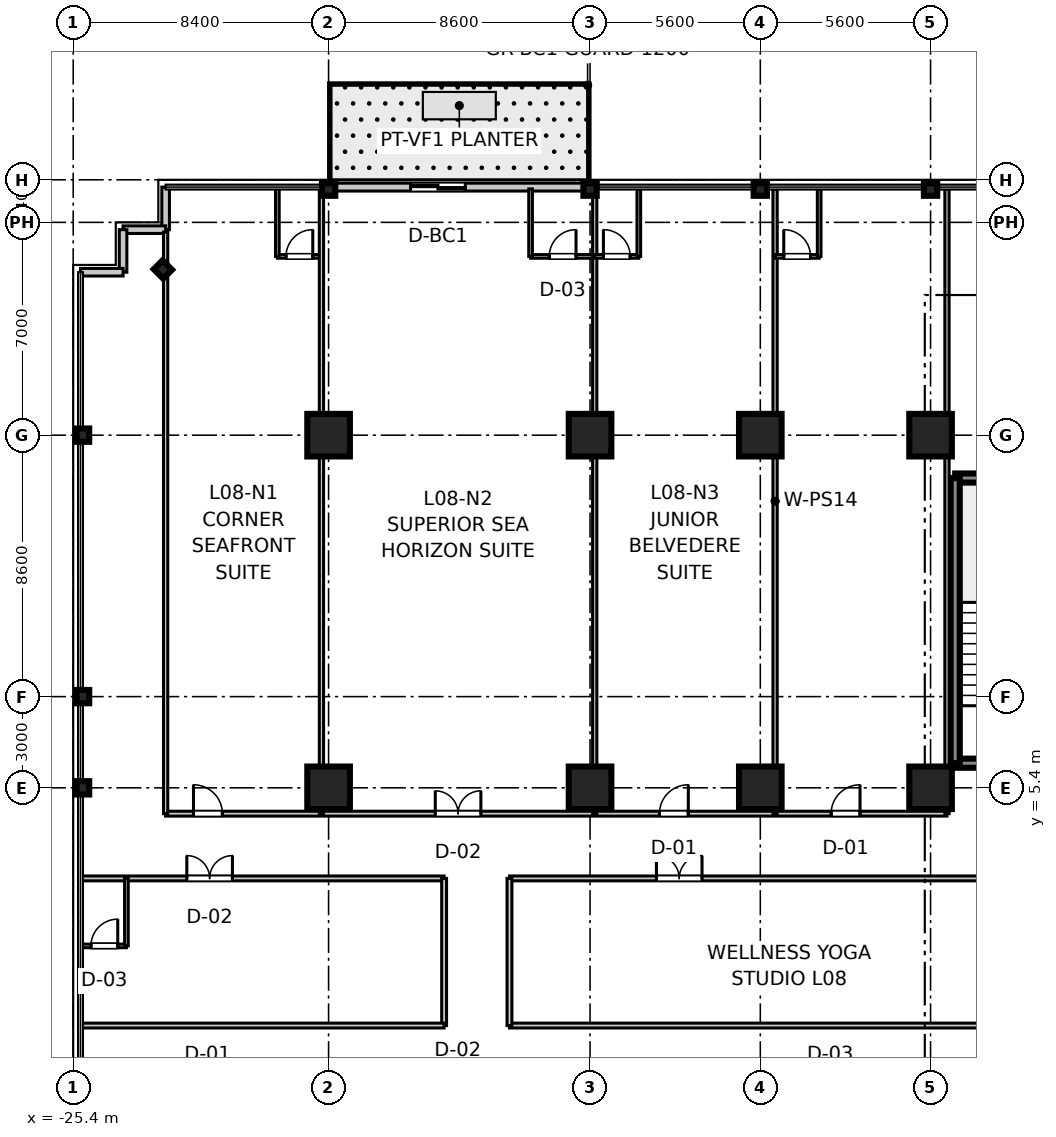
"""IFC4 building model, lengths in metres.
Left out: names, types, materials, properties, quantities, classifications, styles, units other than length and angle.
Written with IfcOpenShell. Run it as: python <this file> out.ifc"""

import sys

from ifc_helpers import new_model, si_unit, direction, frame, frame_2d, origin, origin_2d, place, context, subcontext, project, spatial, rectangle, i_section, extrude, source, transform, mapped, element, fill, save


model = new_model("IFC4")
c1 = context("Model", 3, precision=1e-05, world=origin(), true_north=direction((0.0, 1.0)))
c2 = subcontext(c1, "Body", "Model", "MODEL_VIEW")
j1 = project(units=[si_unit("LENGTHUNIT", "METRE"), si_unit("PLANEANGLEUNIT", "RADIAN")], contexts=[c1])
p1 = place(None, origin())
s1 = spatial("IfcSite", under=j1, at=p1, CompositionType="ELEMENT")
p2 = place(p1, origin())
s2 = spatial("IfcBuilding", under=s1, at=p2, CompositionType="ELEMENT")
p3 = place(p2, frame((0.0, 0.0, 39.7)))
s3 = spatial("IfcBuildingStorey", under=s2, at=p3, CompositionType="ELEMENT", Elevation=39.7)
m1 = source(origin(), c2, "Body", "SweptSolid", [
    extrude(rectangle(XDim=1.4, YDim=1.4, at=origin_2d()), origin(), (0.0, 0.0, 1.0), 3.605),
])
for number, where, z_axis, x_axis in (
    (1, (-17.0, 5.4, 0.0), (0.0, 0.0, 1.0), (1.0, 0.0, 0.0)),
    (2, (-17.0, 17.0, 0.0), (0.0, 0.0, 1.0), (1.0, 0.0, 0.0)),
    (3, (-8.4, 5.4, 0.0), (0.0, 0.0, 1.0), (1.0, 0.0, 0.0)),
    (4, (-8.4, 17.0, 0.0), (0.0, 0.0, 1.0), (1.0, 0.0, 0.0)),
    (5, (-2.8, 5.4, 0.0), (0.0, 0.0, 1.0), (1.0, 0.0, 0.0)),
    (6, (-2.8, 17.0, 0.0), (0.0, 0.0, 1.0), (1.0, 0.0, 0.0)),
    (7, (2.8, 5.4, 0.0), (0.0, 0.0, 1.0), (1.0, 0.0, 0.0)),
    (8, (2.8, 17.0, 0.0), (0.0, 0.0, 1.0), (1.0, 0.0, 0.0)),
):
    element("IfcColumn", number, at=place(p3, frame(where, z_axis=z_axis, x_axis=x_axis)), inside=s3, PredefinedType="COLUMN", context=c2, shape_type="MappedRepresentation", body=[
        mapped(m1, transform((0.0, 0.0, 0.0), scale=1.0)),
    ])
m2 = source(origin(), c2, "Body", "SweptSolid", [
    extrude(i_section(OverallWidth=0.412, OverallDepth=0.438, WebThickness=0.023, FlangeThickness=0.036, at=origin_2d()), origin(), (0.0, 0.0, 1.0), 3.605),
])
for number, where, z_axis, x_axis in (
    (9, (-25.08, 5.4, 0.0), (0.0, 0.0, 1.0), (1.0, 0.0, 0.0)),
    (10, (-25.08, 8.4, 0.0), (0.0, 0.0, 1.0), (1.0, 0.0, 0.0)),
    (11, (-25.08, 17.0, 0.0), (0.0, 0.0, 1.0), (1.0, 0.0, 0.0)),
    (12, (-17.0, 25.08, 0.0), (0.0, 0.0, 1.0), (0.0, 1.0, 0.0)),
    (13, (-8.4, 25.08, 0.0), (0.0, 0.0, 1.0), (0.0, 1.0, 0.0)),
    (14, (-2.8, 25.08, 0.0), (0.0, 0.0, 1.0), (0.0, 1.0, 0.0)),
    (15, (2.8, 25.08, 0.0), (0.0, 0.0, 1.0), (0.0, 1.0, 0.0)),
    (16, (-22.45, 22.45, 0.0), (0.0, 0.0, 1.0), (0.707, 0.707, 0.0)),
):
    element("IfcColumn", number, at=place(p3, frame(where, z_axis=z_axis, x_axis=x_axis)), inside=s3, PredefinedType="COLUMN", context=c2, shape_type="MappedRepresentation", body=[
        mapped(m2, transform((0.0, 0.0, 0.0), scale=1.0)),
    ])
m3 = source(origin(), c2, "Body", "SweptSolid", [
    extrude(rectangle(XDim=3.98, YDim=0.3, at=frame_2d((1.99, 0.0))), origin(), (0.0, 0.0, 1.0), 3.37),
])
for number, where, z_axis, x_axis in (
    (17, (3.61, 6.21, 0.0), (0.0, 0.0, 1.0), (1.0, 0.0, 0.0)),
    (18, (3.61, 15.59, 0.0), (0.0, 0.0, 1.0), (1.0, 0.0, 0.0)),
):
    element("IfcWall", number, at=place(p3, frame(where, z_axis=z_axis, x_axis=x_axis)), inside=s3, PredefinedType="SHEAR", context=c2, shape_type="MappedRepresentation", body=[
        mapped(m3, transform((0.0, 0.0, 0.0), scale=1.0)),
    ])
m4 = source(origin(), c2, "Body", "SweptSolid", [
    extrude(rectangle(XDim=9.38, YDim=0.3, at=frame_2d((4.69, 0.0))), origin(), (0.0, 0.0, 1.0), 3.37),
])
p4 = place(p3, frame((3.61, 6.21, 0.0), z_axis=(0.0, 0.0, 1.0), x_axis=(0.0, 1.0, 0.0)))
e19 = element("IfcWall", 19, at=p4, inside=s3, PredefinedType="SHEAR", context=c2, shape_type="MappedRepresentation", body=[
    mapped(m4, transform((0.0, 0.0, 0.0), scale=1.0)),
])
m5 = source(origin(), c2, "Body", "SweptSolid", [
    extrude(rectangle(XDim=1.4, YDim=0.25, at=frame_2d((0.7, 0.0))), origin(), (0.0, 0.0, 1.0), 3.37),
])
for number, where, z_axis, x_axis in (
    (20, (-22.36, 23.76, 0.0), (0.0, 0.0, 1.0), (0.0, 1.0, 0.0)),
    (21, (-23.76, 23.76, 0.0), (0.0, 0.0, 1.0), (1.0, 0.0, 0.0)),
    (22, (-23.76, 22.36, 0.0), (0.0, 0.0, 1.0), (0.0, 1.0, 0.0)),
    (23, (-25.16, 22.36, 0.0), (0.0, 0.0, 1.0), (1.0, 0.0, 0.0)),
):
    element("IfcWall", number, at=place(p3, frame(where, z_axis=z_axis, x_axis=x_axis)), inside=s3, PredefinedType="STANDARD", context=c2, shape_type="MappedRepresentation", body=[
        mapped(m5, transform((0.0, 0.0, 0.0), scale=1.0)),
    ])
m6 = source(origin(), c2, "Body", "SweptSolid", [
    extrude(rectangle(XDim=8.6, YDim=0.26, at=frame_2d((4.3, 0.0))), origin(), (0.0, 0.0, 1.0), 2.85),
])
p5 = place(p3, frame((-17.0, 25.16, 0.0), z_axis=(0.0, 0.0, 1.0), x_axis=(1.0, 0.0, 0.0)))
e24 = element("IfcWall", 24, at=p5, inside=s3, PredefinedType="STANDARD", context=c2, shape_type="MappedRepresentation", body=[
    mapped(m6, transform((0.0, 0.0, 0.0), scale=1.0)),
])
p6 = place(p5, frame((2.697, 0.0, 0.0)))
e25 = element("IfcOpeningElement", 25, at=p6, cuts=e24, PredefinedType="OPENING", context=c2, shape_type="SweptSolid", body=[
    extrude(rectangle(XDim=1.8, YDim=2.25, at=frame_2d((0.9, 1.125))), frame((0.0, 0.14, 0.0), z_axis=(0.0, -1.0, 0.0), x_axis=(1.0, 0.0, 0.0)), (0.0, 0.0, 1.0), 0.28),
])
m7 = source(origin(), c2, "Body", "SweptSolid", [
    extrude(rectangle(XDim=25.7, YDim=0.16, at=frame_2d((12.85, 0.0))), origin(), (0.0, 0.0, 1.0), 2.71),
])
p7 = place(p3, frame((-22.36, 4.55, 0.0), z_axis=(0.0, 0.0, 1.0), x_axis=(1.0, 0.0, 0.0)))
e26 = element("IfcWall", 26, at=p7, inside=s3, PredefinedType="PARTITIONING", context=c2, shape_type="MappedRepresentation", body=[
    mapped(m7, transform((0.0, 0.0, 0.0), scale=1.0)),
])
p8 = place(p7, frame((0.917, 0.0, 0.0)))
e27 = element("IfcOpeningElement", 27, at=p8, cuts=e26, PredefinedType="OPENING", context=c2, shape_type="SweptSolid", body=[
    extrude(rectangle(XDim=0.95, YDim=2.1, at=frame_2d((0.475, 1.05))), frame((0.0, 0.09, 0.0), z_axis=(0.0, -1.0, 0.0), x_axis=(1.0, 0.0, 0.0)), (0.0, 0.0, 1.0), 0.18),
])
p9 = place(p7, frame((8.869, 0.0, 0.0)))
e28 = element("IfcOpeningElement", 28, at=p9, cuts=e26, PredefinedType="OPENING", context=c2, shape_type="SweptSolid", body=[
    extrude(rectangle(XDim=1.5, YDim=2.15, at=frame_2d((0.75, 1.075))), frame((0.0, 0.09, 0.0), z_axis=(0.0, -1.0, 0.0), x_axis=(1.0, 0.0, 0.0)), (0.0, 0.0, 1.0), 0.18),
])
p10 = place(p7, frame((16.242, 0.0, 0.0)))
e29 = element("IfcOpeningElement", 29, at=p10, cuts=e26, PredefinedType="OPENING", context=c2, shape_type="SweptSolid", body=[
    extrude(rectangle(XDim=0.95, YDim=2.1, at=frame_2d((0.475, 1.05))), frame((0.0, 0.09, 0.0), z_axis=(0.0, -1.0, 0.0), x_axis=(1.0, 0.0, 0.0)), (0.0, 0.0, 1.0), 0.18),
])
p11 = place(p7, frame((21.89, 0.0, 0.0)))
e30 = element("IfcOpeningElement", 30, at=p11, cuts=e26, PredefinedType="OPENING", context=c2, shape_type="SweptSolid", body=[
    extrude(rectangle(XDim=0.95, YDim=2.1, at=frame_2d((0.475, 1.05))), frame((0.0, 0.09, 0.0), z_axis=(0.0, -1.0, 0.0), x_axis=(1.0, 0.0, 0.0)), (0.0, 0.0, 1.0), 0.18),
])
m8 = source(origin(), c2, "Body", "SweptSolid", [
    extrude(rectangle(XDim=19.13, YDim=0.14, at=frame_2d((9.565, 0.0))), origin(), (0.0, 0.0, 1.0), 2.71),
])
p12 = place(p3, frame((-22.36, 4.55, 0.0), z_axis=(0.0, 0.0, 1.0), x_axis=(0.0, 1.0, 0.0)))
e31 = element("IfcWall", 31, at=p12, inside=s3, PredefinedType="PARTITIONING", context=c2, shape_type="MappedRepresentation", body=[
    mapped(m8, transform((0.0, 0.0, 0.0), scale=1.0)),
])
m9 = source(origin(), c2, "Body", "SweptSolid", [
    extrude(rectangle(XDim=20.55, YDim=0.14, at=frame_2d((10.275, 0.0))), origin(), (0.0, 0.0, 1.0), 2.71),
])
p13 = place(p3, frame((3.34, 4.55, 0.0), z_axis=(0.0, 0.0, 1.0), x_axis=(0.0, 1.0, 0.0)))
e32 = element("IfcWall", 32, at=p13, inside=s3, PredefinedType="PARTITIONING", context=c2, shape_type="MappedRepresentation", body=[
    mapped(m9, transform((0.0, 0.0, 0.0), scale=1.0)),
])
m10 = source(origin(), c2, "Body", "SweptSolid", [
    extrude(rectangle(XDim=1.45, YDim=0.12, at=frame_2d((0.725, 0.0))), origin(), (0.0, 0.0, 1.0), 2.71),
])
p14 = place(p3, frame((-18.685, 22.88, 0.0), z_axis=(0.0, 0.0, 1.0), x_axis=(1.0, 0.0, 0.0)))
e33 = element("IfcWall", 33, at=p14, inside=s3, PredefinedType="PARTITIONING", context=c2, shape_type="MappedRepresentation", body=[
    mapped(m10, transform((0.0, 0.0, 0.0), scale=1.0)),
])
p15 = place(p14, frame((0.285, 0.0, 0.0)))
e34 = element("IfcOpeningElement", 34, at=p15, cuts=e33, PredefinedType="OPENING", context=c2, shape_type="SweptSolid", body=[
    extrude(rectangle(XDim=0.88, YDim=2.1, at=frame_2d((0.44, 1.05))), frame((0.0, 0.07, 0.0), z_axis=(0.0, -1.0, 0.0), x_axis=(1.0, 0.0, 0.0)), (0.0, 0.0, 1.0), 0.14),
])
m11 = source(origin(), c2, "Body", "SweptSolid", [
    extrude(rectangle(XDim=2.22, YDim=0.12, at=frame_2d((1.11, 0.0))), origin(), (0.0, 0.0, 1.0), 2.71),
])
p16 = place(p3, frame((-18.685, 22.88, 0.0), z_axis=(0.0, 0.0, 1.0), x_axis=(0.0, 1.0, 0.0)))
e35 = element("IfcWall", 35, at=p16, inside=s3, PredefinedType="PARTITIONING", context=c2, shape_type="MappedRepresentation", body=[
    mapped(m11, transform((0.0, 0.0, 0.0), scale=1.0)),
])
p17 = place(p3, frame((-17.235, 4.55, 0.0), z_axis=(0.0, 0.0, 1.0), x_axis=(0.0, 1.0, 0.0)))
e36 = element("IfcWall", 36, at=p17, inside=s3, PredefinedType="PARTITIONING", context=c2, shape_type="MappedRepresentation", body=[
    mapped(m9, transform((0.0, 0.0, 0.0), scale=1.0)),
])
m12 = source(origin(), c2, "Body", "SweptSolid", [
    extrude(rectangle(XDim=2.11, YDim=0.12, at=frame_2d((1.055, 0.0))), origin(), (0.0, 0.0, 1.0), 2.71),
])
p18 = place(p3, frame((-10.356, 22.88, 0.0), z_axis=(0.0, 0.0, 1.0), x_axis=(1.0, 0.0, 0.0)))
e37 = element("IfcWall", 37, at=p18, inside=s3, PredefinedType="PARTITIONING", context=c2, shape_type="MappedRepresentation", body=[
    mapped(m12, transform((0.0, 0.0, 0.0), scale=1.0)),
])
p19 = place(p18, frame((0.615, 0.0, 0.0)))
e38 = element("IfcOpeningElement", 38, at=p19, cuts=e37, PredefinedType="OPENING", context=c2, shape_type="SweptSolid", body=[
    extrude(rectangle(XDim=0.88, YDim=2.1, at=frame_2d((0.44, 1.05))), frame((0.0, 0.07, 0.0), z_axis=(0.0, -1.0, 0.0), x_axis=(1.0, 0.0, 0.0)), (0.0, 0.0, 1.0), 0.14),
])
p20 = place(p3, frame((-10.356, 22.88, 0.0), z_axis=(0.0, 0.0, 1.0), x_axis=(0.0, 1.0, 0.0)))
e39 = element("IfcWall", 39, at=p20, inside=s3, PredefinedType="PARTITIONING", context=c2, shape_type="MappedRepresentation", body=[
    mapped(m11, transform((0.0, 0.0, 0.0), scale=1.0)),
])
p21 = place(p3, frame((-8.246, 4.55, 0.0), z_axis=(0.0, 0.0, 1.0), x_axis=(0.0, 1.0, 0.0)))
e40 = element("IfcWall", 40, at=p21, inside=s3, PredefinedType="PARTITIONING", context=c2, shape_type="MappedRepresentation", body=[
    mapped(m9, transform((0.0, 0.0, 0.0), scale=1.0)),
])
m13 = source(origin(), c2, "Body", "SweptSolid", [
    extrude(rectangle(XDim=1.45, YDim=0.12, at=frame_2d((0.725, 0.0))), origin(), (0.0, 0.0, 1.0), 2.71),
])
p22 = place(p3, frame((-8.246, 22.88, 0.0), z_axis=(0.0, 0.0, 1.0), x_axis=(1.0, 0.0, 0.0)))
e41 = element("IfcWall", 41, at=p22, inside=s3, PredefinedType="PARTITIONING", context=c2, shape_type="MappedRepresentation", body=[
    mapped(m13, transform((0.0, 0.0, 0.0), scale=1.0)),
])
p23 = place(p22, frame((0.285, 0.0, 0.0)))
e42 = element("IfcOpeningElement", 42, at=p23, cuts=e41, PredefinedType="OPENING", context=c2, shape_type="SweptSolid", body=[
    extrude(rectangle(XDim=0.88, YDim=2.1, at=frame_2d((0.44, 1.05))), frame((0.0, 0.07, 0.0), z_axis=(0.0, -1.0, 0.0), x_axis=(1.0, 0.0, 0.0)), (0.0, 0.0, 1.0), 0.14),
])
p24 = place(p3, frame((-6.796, 22.88, 0.0), z_axis=(0.0, 0.0, 1.0), x_axis=(0.0, 1.0, 0.0)))
e43 = element("IfcWall", 43, at=p24, inside=s3, PredefinedType="PARTITIONING", context=c2, shape_type="MappedRepresentation", body=[
    mapped(m11, transform((0.0, 0.0, 0.0), scale=1.0)),
])
p25 = place(p3, frame((-2.314, 4.55, 0.0), z_axis=(0.0, 0.0, 1.0), x_axis=(0.0, 1.0, 0.0)))
e44 = element("IfcWall", 44, at=p25, inside=s3, PredefinedType="PARTITIONING", context=c2, shape_type="MappedRepresentation", body=[
    mapped(m9, transform((0.0, 0.0, 0.0), scale=1.0)),
])
p26 = place(p3, frame((-2.314, 22.88, 0.0), z_axis=(0.0, 0.0, 1.0), x_axis=(1.0, 0.0, 0.0)))
e45 = element("IfcWall", 45, at=p26, inside=s3, PredefinedType="PARTITIONING", context=c2, shape_type="MappedRepresentation", body=[
    mapped(m10, transform((0.0, 0.0, 0.0), scale=1.0)),
])
p27 = place(p26, frame((0.285, 0.0, 0.0)))
e46 = element("IfcOpeningElement", 46, at=p27, cuts=e45, PredefinedType="OPENING", context=c2, shape_type="SweptSolid", body=[
    extrude(rectangle(XDim=0.88, YDim=2.1, at=frame_2d((0.44, 1.05))), frame((0.0, 0.07, 0.0), z_axis=(0.0, -1.0, 0.0), x_axis=(1.0, 0.0, 0.0)), (0.0, 0.0, 1.0), 0.14),
])
p28 = place(p3, frame((-0.864, 22.88, 0.0), z_axis=(0.0, 0.0, 1.0), x_axis=(0.0, 1.0, 0.0)))
e47 = element("IfcWall", 47, at=p28, inside=s3, PredefinedType="PARTITIONING", context=c2, shape_type="MappedRepresentation", body=[
    mapped(m11, transform((0.0, 0.0, 0.0), scale=1.0)),
])
m14 = source(origin(), c2, "Body", "SweptSolid", [
    extrude(rectangle(XDim=11.9, YDim=0.16, at=frame_2d((5.95, 0.0))), origin(), (0.0, 0.0, 1.0), 2.71),
])
p29 = place(p3, frame((-25.1, 2.42, 0.0), z_axis=(0.0, 0.0, 1.0), x_axis=(1.0, 0.0, 0.0)))
e48 = element("IfcWall", 48, at=p29, inside=s3, PredefinedType="PARTITIONING", context=c2, shape_type="MappedRepresentation", body=[
    mapped(m14, transform((0.0, 0.0, 0.0), scale=1.0)),
])
p30 = place(p29, frame((3.437, 0.0, 0.0)))
e49 = element("IfcOpeningElement", 49, at=p30, cuts=e48, PredefinedType="OPENING", context=c2, shape_type="SweptSolid", body=[
    extrude(rectangle(XDim=1.5, YDim=2.15, at=frame_2d((0.75, 1.075))), frame((0.0, 0.09, 0.0), z_axis=(0.0, -1.0, 0.0), x_axis=(1.0, 0.0, 0.0)), (0.0, 0.0, 1.0), 0.18),
])
m15 = source(origin(), c2, "Body", "SweptSolid", [
    extrude(rectangle(XDim=4.84, YDim=0.16, at=frame_2d((2.42, 0.0))), origin(), (0.0, 0.0, 1.0), 2.71),
])
p31 = place(p3, frame((-13.2, -2.42, 0.0), z_axis=(0.0, 0.0, 1.0), x_axis=(0.0, 1.0, 0.0)))
e50 = element("IfcWall", 50, at=p31, inside=s3, PredefinedType="PARTITIONING", context=c2, shape_type="MappedRepresentation", body=[
    mapped(m15, transform((0.0, 0.0, 0.0), scale=1.0)),
])
p32 = place(p3, frame((-25.1, -2.42, 0.0), z_axis=(0.0, 0.0, 1.0), x_axis=(1.0, 0.0, 0.0)))
e51 = element("IfcWall", 51, at=p32, inside=s3, PredefinedType="PARTITIONING", context=c2, shape_type="MappedRepresentation", body=[
    mapped(m14, transform((0.0, 0.0, 0.0), scale=1.0)),
])
p33 = place(p3, frame((-25.1, 0.2, 0.0), z_axis=(0.0, 0.0, 1.0), x_axis=(1.0, 0.0, 0.0)))
e52 = element("IfcWall", 52, at=p33, inside=s3, PredefinedType="PARTITIONING", context=c2, shape_type="MappedRepresentation", body=[
    mapped(m13, transform((0.0, 0.0, 0.0), scale=1.0)),
])
p34 = place(p33, frame((0.285, 0.0, 0.0)))
e53 = element("IfcOpeningElement", 53, at=p34, cuts=e52, PredefinedType="OPENING", context=c2, shape_type="SweptSolid", body=[
    extrude(rectangle(XDim=0.88, YDim=2.1, at=frame_2d((0.44, 1.05))), frame((0.0, 0.07, 0.0), z_axis=(0.0, -1.0, 0.0), x_axis=(1.0, 0.0, 0.0)), (0.0, 0.0, 1.0), 0.14),
])
m16 = source(origin(), c2, "Body", "SweptSolid", [
    extrude(rectangle(XDim=2.22, YDim=0.12, at=frame_2d((1.11, 0.0))), origin(), (0.0, 0.0, 1.0), 2.71),
])
p35 = place(p3, frame((-23.65, 0.2, 0.0), z_axis=(0.0, 0.0, 1.0), x_axis=(0.0, 1.0, 0.0)))
e54 = element("IfcWall", 54, at=p35, inside=s3, PredefinedType="PARTITIONING", context=c2, shape_type="MappedRepresentation", body=[
    mapped(m16, transform((0.0, 0.0, 0.0), scale=1.0)),
])
m17 = source(origin(), c2, "Body", "SweptSolid", [
    extrude(rectangle(XDim=18.4, YDim=0.16, at=frame_2d((9.2, 0.0))), origin(), (0.0, 0.0, 1.0), 2.71),
])
p36 = place(p3, frame((-11.05, -2.42, 0.0), z_axis=(0.0, 0.0, 1.0), x_axis=(1.0, 0.0, 0.0)))
e55 = element("IfcWall", 55, at=p36, inside=s3, PredefinedType="PARTITIONING", context=c2, shape_type="MappedRepresentation", body=[
    mapped(m17, transform((0.0, 0.0, 0.0), scale=1.0)),
])
p37 = place(p3, frame((-11.05, 2.42, 0.0), z_axis=(0.0, 0.0, 1.0), x_axis=(1.0, 0.0, 0.0)))
e56 = element("IfcWall", 56, at=p37, inside=s3, PredefinedType="PARTITIONING", context=c2, shape_type="MappedRepresentation", body=[
    mapped(m17, transform((0.0, 0.0, 0.0), scale=1.0)),
])
p38 = place(p37, frame((4.833, 0.0, 0.0)))
e57 = element("IfcOpeningElement", 57, at=p38, cuts=e56, PredefinedType="OPENING", context=c2, shape_type="SweptSolid", body=[
    extrude(rectangle(XDim=1.5, YDim=2.15, at=frame_2d((0.75, 1.075))), frame((0.0, 0.09, 0.0), z_axis=(0.0, -1.0, 0.0), x_axis=(1.0, 0.0, 0.0)), (0.0, 0.0, 1.0), 0.18),
])
p39 = place(p3, frame((-11.05, -2.42, 0.0), z_axis=(0.0, 0.0, 1.0), x_axis=(0.0, 1.0, 0.0)))
e58 = element("IfcWall", 58, at=p39, inside=s3, PredefinedType="PARTITIONING", context=c2, shape_type="MappedRepresentation", body=[
    mapped(m15, transform((0.0, 0.0, 0.0), scale=1.0)),
])
m18 = source(origin(), c2, "Body", "SweptSolid", [
    extrude(rectangle(XDim=0.88, YDim=2.1, at=frame_2d((0.44, 1.05))), frame((0.0, 0.025, 0.0), z_axis=(0.0, -1.0, 0.0), x_axis=(1.0, 0.0, 0.0)), (0.0, 0.0, 1.0), 0.05),
])
p40 = place(p15, origin())
e59 = element("IfcDoor", 59, at=p40, inside=s3, OperationType="SINGLE_SWING_RIGHT", PredefinedType="DOOR", context=c2, shape_type="MappedRepresentation", body=[
    mapped(m18, transform((0.0, 0.0, 0.0), scale=1.0)),
])
fill(e34, e59)
m19 = source(origin(), c2, "Body", "SweptSolid", [
    extrude(rectangle(XDim=0.95, YDim=2.1, at=frame_2d((0.475, 1.05))), frame((0.0, 0.025, 0.0), z_axis=(0.0, -1.0, 0.0), x_axis=(1.0, 0.0, 0.0)), (0.0, 0.0, 1.0), 0.05),
])
p41 = place(p8, origin())
e60 = element("IfcDoor", 60, at=p41, inside=s3, OperationType="SINGLE_SWING_LEFT", PredefinedType="DOOR", context=c2, shape_type="MappedRepresentation", body=[
    mapped(m19, transform((0.0, 0.0, 0.0), scale=1.0)),
])
fill(e27, e60)
p42 = place(p19, origin())
e61 = element("IfcDoor", 61, at=p42, inside=s3, OperationType="SINGLE_SWING_RIGHT", PredefinedType="DOOR", context=c2, shape_type="MappedRepresentation", body=[
    mapped(m18, transform((0.0, 0.0, 0.0), scale=1.0)),
])
fill(e38, e61)
m20 = source(origin(), c2, "Body", "SweptSolid", [
    extrude(rectangle(XDim=1.5, YDim=2.15, at=frame_2d((0.75, 1.075))), frame((0.0, 0.025, 0.0), z_axis=(0.0, -1.0, 0.0), x_axis=(1.0, 0.0, 0.0)), (0.0, 0.0, 1.0), 0.05),
])
p43 = place(p9, origin())
e62 = element("IfcDoor", 62, at=p43, inside=s3, OperationType="DOUBLE_DOOR_SINGLE_SWING", PredefinedType="DOOR", context=c2, shape_type="MappedRepresentation", body=[
    mapped(m20, transform((0.0, 0.0, 0.0), scale=1.0)),
])
fill(e28, e62)
p44 = place(p23, origin())
e63 = element("IfcDoor", 63, at=p44, inside=s3, OperationType="SINGLE_SWING_LEFT", PredefinedType="DOOR", context=c2, shape_type="MappedRepresentation", body=[
    mapped(m18, transform((0.0, 0.0, 0.0), scale=1.0)),
])
fill(e42, e63)
p45 = place(p10, origin())
e64 = element("IfcDoor", 64, at=p45, inside=s3, OperationType="SINGLE_SWING_RIGHT", PredefinedType="DOOR", context=c2, shape_type="MappedRepresentation", body=[
    mapped(m19, transform((0.0, 0.0, 0.0), scale=1.0)),
])
fill(e29, e64)
p46 = place(p27, origin())
e65 = element("IfcDoor", 65, at=p46, inside=s3, OperationType="SINGLE_SWING_LEFT", PredefinedType="DOOR", context=c2, shape_type="MappedRepresentation", body=[
    mapped(m18, transform((0.0, 0.0, 0.0), scale=1.0)),
])
fill(e46, e65)
p47 = place(p11, origin())
e66 = element("IfcDoor", 66, at=p47, inside=s3, OperationType="SINGLE_SWING_RIGHT", PredefinedType="DOOR", context=c2, shape_type="MappedRepresentation", body=[
    mapped(m19, transform((0.0, 0.0, 0.0), scale=1.0)),
])
fill(e30, e66)
p48 = place(p34, origin())
e67 = element("IfcDoor", 67, at=p48, inside=s3, OperationType="SINGLE_SWING_RIGHT", PredefinedType="DOOR", context=c2, shape_type="MappedRepresentation", body=[
    mapped(m18, transform((0.0, 0.0, 0.0), scale=1.0)),
])
fill(e53, e67)
p49 = place(p30, origin())
e68 = element("IfcDoor", 68, at=p49, inside=s3, OperationType="DOUBLE_DOOR_SINGLE_SWING", PredefinedType="DOOR", context=c2, shape_type="MappedRepresentation", body=[
    mapped(m20, transform((0.0, 0.0, 0.0), scale=1.0)),
])
fill(e49, e68)
p50 = place(p38, frame((1.5, 0.0, 0.0), z_axis=(0.0, 0.0, 1.0), x_axis=(-1.0, 0.0, 0.0)))
e69 = element("IfcDoor", 69, at=p50, inside=s3, OperationType="DOUBLE_DOOR_SINGLE_SWING", PredefinedType="DOOR", context=c2, shape_type="MappedRepresentation", body=[
    mapped(m20, transform((0.0, 0.0, 0.0), scale=1.0)),
])
fill(e57, e69)
m21 = source(origin(), c2, "Body", "SweptSolid", [
    extrude(rectangle(XDim=1.8, YDim=2.25, at=frame_2d((0.9, 1.125))), frame((0.0, 0.025, 0.0), z_axis=(0.0, -1.0, 0.0), x_axis=(1.0, 0.0, 0.0)), (0.0, 0.0, 1.0), 0.05),
])
p51 = place(p6, origin())
e70 = element("IfcDoor", 70, at=p51, inside=s3, OperationType="DOUBLE_DOOR_SLIDING", PredefinedType="DOOR", context=c2, shape_type="MappedRepresentation", body=[
    mapped(m21, transform((0.0, 0.0, 0.0), scale=1.0)),
])
fill(e25, e70)
save(model, sys.argv[1])
